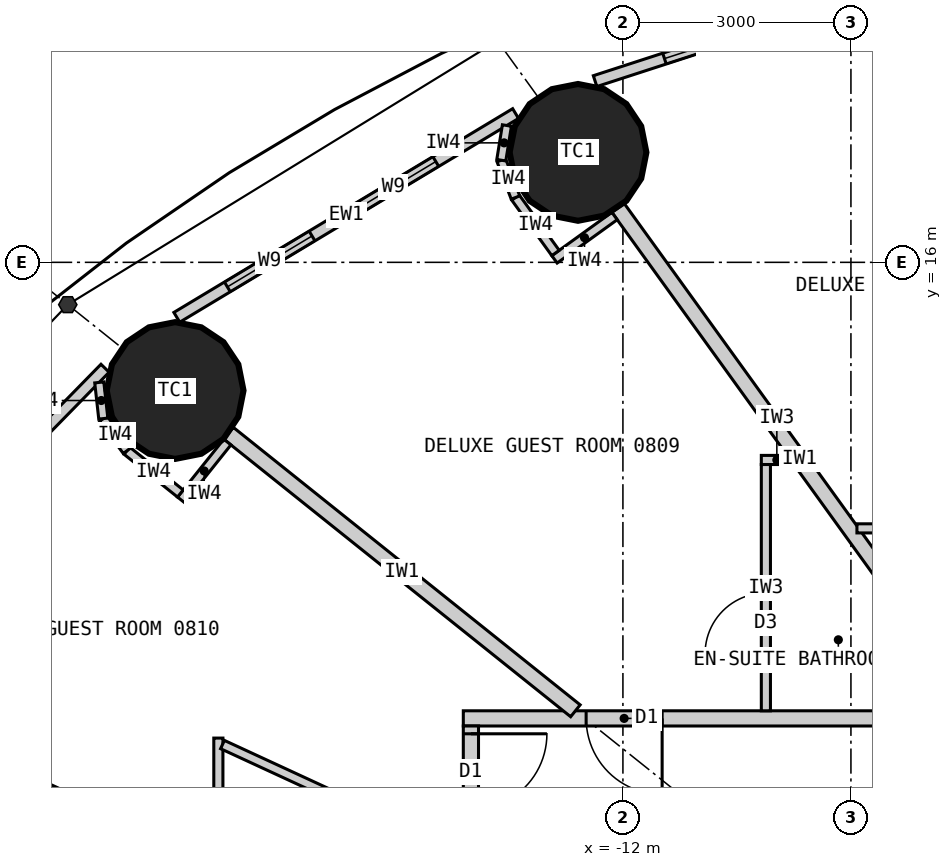
"""IFC4 building model, lengths in metres.
Left out: names, types, materials, properties, quantities, classifications, styles, units other than length and angle.
Written with IfcOpenShell. Run it as: python <this file> out.ifc"""

import sys

from ifc_helpers import new_model, si_unit, direction, frame, frame_2d, origin, origin_2d, place, context, subcontext, project, spatial, rectangle, circle, extrude, element, fill, save


model = new_model("IFC4")
c1 = context("Model", 3, precision=1e-05, world=origin(), true_north=direction((0.0, 1.0)))
c2 = subcontext(c1, "Body", "Model", "MODEL_VIEW")
j1 = project(units=[si_unit("LENGTHUNIT", "METRE"), si_unit("PLANEANGLEUNIT", "RADIAN")], contexts=[c1])
p1 = place(None, origin())
s1 = spatial("IfcSite", under=j1, at=p1, CompositionType="ELEMENT")
p2 = place(p1, origin())
s2 = spatial("IfcBuilding", under=s1, at=p2, CompositionType="ELEMENT")
p3 = place(p2, frame((0.0, 0.0, 39.3)))
s3 = spatial("IfcBuildingStorey", under=s2, at=p3, CompositionType="ELEMENT", Elevation=39.3)
for number, where, z_axis, x_axis in (
    (1, (-12.591, 17.447, 0.0), (0.0, 0.0, 1.0), (1.0, 0.0, 0.0)),
    (2, (-17.892, 14.313, 0.0), (0.0, 0.0, 1.0), (1.0, 0.0, 0.0)),
):
    element("IfcColumn", number, at=place(p3, frame(where, z_axis=z_axis, x_axis=x_axis)), inside=s3, PredefinedType="COLUMN", context=c2, shape_type="SweptSolid", body=[
        extrude(circle(Radius=0.9, at=origin_2d()), origin(), (0.0, 0.0, 1.0), 3.3),
    ])
p4 = place(p3, frame((-7.188, 20.065, 0.0), z_axis=(0.0, 0.0, 1.0), x_axis=(-0.951138486029, -0.308764603532, 0.0)))
e3 = element("IfcWall", 3, at=p4, inside=s3, PredefinedType="ELEMENTEDWALL", context=c2, shape_type="SweptSolid", body=[
    extrude(rectangle(XDim=5.444, YDim=0.15, at=frame_2d((2.722, 0.0))), origin(), (0.0, 0.0, 1.0), 3.12),
])
p5 = place(p4, frame((1.284, 0.0, 0.9)))
e4 = element("IfcOpeningElement", 4, at=p5, cuts=e3, PredefinedType="OPENING", context=c2, shape_type="SweptSolid", body=[
    extrude(rectangle(XDim=1.3, YDim=1.9, at=frame_2d((0.65, 0.95))), frame((0.0, 0.085, 0.0), z_axis=(0.0, -1.0, 0.0), x_axis=(1.0, 0.0, 0.0)), (0.0, 0.0, 1.0), 0.17),
])
p6 = place(p4, frame((3.184, 0.0, 0.9)))
e5 = element("IfcOpeningElement", 5, at=p6, cuts=e3, PredefinedType="OPENING", context=c2, shape_type="SweptSolid", body=[
    extrude(rectangle(XDim=1.3, YDim=1.9, at=frame_2d((0.65, 0.95))), frame((0.0, 0.085, 0.0), z_axis=(0.0, -1.0, 0.0), x_axis=(1.0, 0.0, 0.0)), (0.0, 0.0, 1.0), 0.17),
])
p7 = place(p3, frame((-13.412, 17.957, 0.0), z_axis=(0.0, 0.0, 1.0), x_axis=(-0.856958191554, -0.515385931054, 0.0)))
e6 = element("IfcWall", 6, at=p7, inside=s3, PredefinedType="ELEMENTEDWALL", context=c2, shape_type="SweptSolid", body=[
    extrude(rectangle(XDim=5.201, YDim=0.15, at=frame_2d((2.601, 0.0))), origin(), (0.0, 0.0, 1.0), 3.12),
])
p8 = place(p7, frame((1.225, 0.0, 0.9)))
e7 = element("IfcOpeningElement", 7, at=p8, cuts=e6, PredefinedType="OPENING", context=c2, shape_type="SweptSolid", body=[
    extrude(rectangle(XDim=1.3, YDim=1.9, at=frame_2d((0.65, 0.95))), frame((0.0, 0.085, 0.0), z_axis=(0.0, -1.0, 0.0), x_axis=(1.0, 0.0, 0.0)), (0.0, 0.0, 1.0), 0.17),
])
p9 = place(p7, frame((3.125, 0.0, 0.9)))
e8 = element("IfcOpeningElement", 8, at=p9, cuts=e6, PredefinedType="OPENING", context=c2, shape_type="SweptSolid", body=[
    extrude(rectangle(XDim=1.3, YDim=1.9, at=frame_2d((0.65, 0.95))), frame((0.0, 0.085, 0.0), z_axis=(0.0, -1.0, 0.0), x_axis=(1.0, 0.0, 0.0)), (0.0, 0.0, 1.0), 0.17),
])
p10 = place(p3, frame((-18.813, 14.607, 0.0), z_axis=(0.0, 0.0, 1.0), x_axis=(-0.699612594083, -0.714522370679, 0.0)))
e9 = element("IfcWall", 9, at=p10, inside=s3, PredefinedType="ELEMENTEDWALL", context=c2, shape_type="SweptSolid", body=[
    extrude(rectangle(XDim=4.896, YDim=0.15, at=frame_2d((2.448, 0.0))), origin(), (0.0, 0.0, 1.0), 3.12),
])
p11 = place(p10, frame((1.077, 0.0, 0.9)))
e10 = element("IfcOpeningElement", 10, at=p11, cuts=e9, PredefinedType="OPENING", context=c2, shape_type="SweptSolid", body=[
    extrude(rectangle(XDim=1.3, YDim=1.9, at=frame_2d((0.65, 0.95))), frame((0.0, 0.085, 0.0), z_axis=(0.0, -1.0, 0.0), x_axis=(1.0, 0.0, 0.0)), (0.0, 0.0, 1.0), 0.17),
])
p12 = place(p10, frame((2.977, 0.0, 0.9)))
e11 = element("IfcOpeningElement", 11, at=p12, cuts=e9, PredefinedType="OPENING", context=c2, shape_type="SweptSolid", body=[
    extrude(rectangle(XDim=1.3, YDim=1.9, at=frame_2d((0.65, 0.95))), frame((0.0, 0.085, 0.0), z_axis=(0.0, -1.0, 0.0), x_axis=(1.0, 0.0, 0.0)), (0.0, 0.0, 1.0), 0.17),
])
p13 = place(p3, frame((-14.1, 10.0, 0.0), z_axis=(0.0, 0.0, 1.0), x_axis=(1.0, 0.0, 0.0)))
e12 = element("IfcWall", 12, at=p13, inside=s3, PredefinedType="PARTITIONING", context=c2, shape_type="SweptSolid", body=[
    extrude(rectangle(XDim=28.2, YDim=0.2, at=frame_2d((14.1, 0.0))), origin(), (0.0, 0.0, 1.0), 3.12),
])
p14 = place(p13, frame((23.477, 0.0, 0.0)))
e13 = element("IfcOpeningElement", 13, at=p14, cuts=e12, PredefinedType="OPENING", context=c2, shape_type="SweptSolid", body=[
    extrude(rectangle(XDim=1.0, YDim=2.2, at=frame_2d((0.5, 1.1))), frame((0.0, 0.11, 0.0), z_axis=(0.0, -1.0, 0.0), x_axis=(1.0, 0.0, 0.0)), (0.0, 0.0, 1.0), 0.22),
])
p15 = place(p13, frame((18.529, 0.0, 0.0)))
e14 = element("IfcOpeningElement", 14, at=p15, cuts=e12, PredefinedType="OPENING", context=c2, shape_type="SweptSolid", body=[
    extrude(rectangle(XDim=1.0, YDim=2.2, at=frame_2d((0.5, 1.1))), frame((0.0, 0.11, 0.0), z_axis=(0.0, -1.0, 0.0), x_axis=(1.0, 0.0, 0.0)), (0.0, 0.0, 1.0), 0.22),
])
p16 = place(p13, frame((14.623, 0.0, 0.0)))
e15 = element("IfcOpeningElement", 15, at=p16, cuts=e12, PredefinedType="OPENING", context=c2, shape_type="SweptSolid", body=[
    extrude(rectangle(XDim=1.0, YDim=2.2, at=frame_2d((0.5, 1.1))), frame((0.0, 0.11, 0.0), z_axis=(0.0, -1.0, 0.0), x_axis=(1.0, 0.0, 0.0)), (0.0, 0.0, 1.0), 0.22),
])
p17 = place(p13, frame((11.252, 0.0, 0.0)))
e16 = element("IfcOpeningElement", 16, at=p17, cuts=e12, PredefinedType="OPENING", context=c2, shape_type="SweptSolid", body=[
    extrude(rectangle(XDim=1.0, YDim=2.1, at=frame_2d((0.5, 1.05))), frame((0.0, 0.11, 0.0), z_axis=(0.0, -1.0, 0.0), x_axis=(1.0, 0.0, 0.0)), (0.0, 0.0, 1.0), 0.22),
])
p18 = place(p13, frame((8.671, 0.0, 0.0)))
e17 = element("IfcOpeningElement", 17, at=p18, cuts=e12, PredefinedType="OPENING", context=c2, shape_type="SweptSolid", body=[
    extrude(rectangle(XDim=1.0, YDim=2.2, at=frame_2d((0.5, 1.1))), frame((0.0, 0.11, 0.0), z_axis=(0.0, -1.0, 0.0), x_axis=(1.0, 0.0, 0.0)), (0.0, 0.0, 1.0), 0.22),
])
p19 = place(p13, frame((1.616, 0.0, 0.0)))
e18 = element("IfcOpeningElement", 18, at=p19, cuts=e12, PredefinedType="OPENING", context=c2, shape_type="SweptSolid", body=[
    extrude(rectangle(XDim=1.0, YDim=2.2, at=frame_2d((0.5, 1.1))), frame((0.0, 0.11, 0.0), z_axis=(0.0, -1.0, 0.0), x_axis=(1.0, 0.0, 0.0)), (0.0, 0.0, 1.0), 0.22),
])
p20 = place(p3, frame((-14.0, 9.9, 0.0), z_axis=(0.0, 0.0, 1.0), x_axis=(0.0, -1.0, 0.0)))
e19 = element("IfcWall", 19, at=p20, inside=s3, PredefinedType="PARTITIONING", context=c2, shape_type="SweptSolid", body=[
    extrude(rectangle(XDim=19.8, YDim=0.2, at=frame_2d((9.9, 0.0))), origin(), (0.0, 0.0, 1.0), 3.12),
])
p21 = place(p20, frame((0.103, 0.0, 0.0)))
e20 = element("IfcOpeningElement", 20, at=p21, cuts=e19, PredefinedType="OPENING", context=c2, shape_type="SweptSolid", body=[
    extrude(rectangle(XDim=1.0, YDim=2.2, at=frame_2d((0.5, 1.1))), frame((0.0, 0.11, 0.0), z_axis=(0.0, -1.0, 0.0), x_axis=(1.0, 0.0, 0.0)), (0.0, 0.0, 1.0), 0.22),
])
p22 = place(p20, frame((5.252, 0.0, 0.0)))
e21 = element("IfcOpeningElement", 21, at=p22, cuts=e19, PredefinedType="OPENING", context=c2, shape_type="SweptSolid", body=[
    extrude(rectangle(XDim=1.0, YDim=2.0, at=frame_2d((0.5, 1.0))), frame((0.0, 0.11, 0.0), z_axis=(0.0, -1.0, 0.0), x_axis=(1.0, 0.0, 0.0)), (0.0, 0.0, 1.0), 0.22),
])
p23 = place(p20, frame((10.117, 0.0, 0.0)))
e22 = element("IfcOpeningElement", 22, at=p23, cuts=e19, PredefinedType="OPENING", context=c2, shape_type="SweptSolid", body=[
    extrude(rectangle(XDim=1.0, YDim=2.2, at=frame_2d((0.5, 1.1))), frame((0.0, 0.11, 0.0), z_axis=(0.0, -1.0, 0.0), x_axis=(1.0, 0.0, 0.0)), (0.0, 0.0, 1.0), 0.22),
])
p24 = place(p20, frame((13.247, 0.0, 0.0)))
e23 = element("IfcOpeningElement", 23, at=p24, cuts=e19, PredefinedType="OPENING", context=c2, shape_type="SweptSolid", body=[
    extrude(rectangle(XDim=1.0, YDim=2.0, at=frame_2d((0.5, 1.0))), frame((0.0, 0.11, 0.0), z_axis=(0.0, -1.0, 0.0), x_axis=(1.0, 0.0, 0.0)), (0.0, 0.0, 1.0), 0.22),
])
p25 = place(p20, frame((15.679, 0.0, 0.0)))
e24 = element("IfcOpeningElement", 24, at=p25, cuts=e19, PredefinedType="OPENING", context=c2, shape_type="SweptSolid", body=[
    extrude(rectangle(XDim=1.0, YDim=2.2, at=frame_2d((0.5, 1.1))), frame((0.0, 0.11, 0.0), z_axis=(0.0, -1.0, 0.0), x_axis=(1.0, 0.0, 0.0)), (0.0, 0.0, 1.0), 0.22),
])
p26 = place(p3, frame((-7.289, 10.1, 0.0), z_axis=(0.0, 0.0, 1.0), x_axis=(-0.585216319319, 0.810877216108, 0.0)))
e25 = element("IfcWall", 25, at=p26, inside=s3, PredefinedType="PARTITIONING", context=c2, shape_type="SweptSolid", body=[
    extrude(rectangle(XDim=8.16, YDim=0.2, at=frame_2d((4.08, 0.0))), origin(), (0.0, 0.0, 1.0), 2.32),
])
p27 = place(p3, frame((-12.625, 10.1, 0.0), z_axis=(0.0, 0.0, 1.0), x_axis=(-0.780872884676, 0.624689953479, 0.0)))
e26 = element("IfcWall", 26, at=p27, inside=s3, PredefinedType="PARTITIONING", context=c2, shape_type="SweptSolid", body=[
    extrude(rectangle(XDim=5.845, YDim=0.2, at=frame_2d((2.922, 0.0))), origin(), (0.0, 0.0, 1.0), 2.32),
])
p28 = place(p3, frame((-14.1, 6.512, 0.0), z_axis=(0.0, 0.0, 1.0), x_axis=(-0.907842433118, 0.41931147925, 0.0)))
e27 = element("IfcWall", 27, at=p28, inside=s3, PredefinedType="PARTITIONING", context=c2, shape_type="SweptSolid", body=[
    extrude(rectangle(XDim=7.823, YDim=0.2, at=frame_2d((3.912, 0.0))), origin(), (0.0, 0.0, 1.0), 2.32),
])
p29 = place(p3, frame((-8.921, 12.5, 0.0), z_axis=(0.0, 0.0, 1.0), x_axis=(1.0, 0.0, 0.0)))
e28 = element("IfcWall", 28, at=p29, inside=s3, PredefinedType="PARTITIONING", context=c2, shape_type="SweptSolid", body=[
    extrude(rectangle(XDim=3.372, YDim=0.12, at=frame_2d((1.686, 0.0))), origin(), (0.0, 0.0, 1.0), 3.12),
])
p30 = place(p3, frame((-9.771, 13.4, 0.0), z_axis=(0.0, 0.0, 1.0), x_axis=(-1.0, 0.0, 0.0)))
e29 = element("IfcWall", 29, at=p30, inside=s3, PredefinedType="PARTITIONING", context=c2, shape_type="SweptSolid", body=[
    extrude(rectangle(XDim=0.408, YDim=0.12, at=frame_2d((0.204, 0.0))), origin(), (0.0, 0.0, 1.0), 3.12),
])
p31 = place(p3, frame((-10.119, 10.1, 0.0), z_axis=(0.0, 0.0, 1.0), x_axis=(0.0, 1.0, 0.0)))
e30 = element("IfcWall", 30, at=p31, inside=s3, PredefinedType="PARTITIONING", context=c2, shape_type="SweptSolid", body=[
    extrude(rectangle(XDim=3.24, YDim=0.12, at=frame_2d((1.62, 0.0))), origin(), (0.0, 0.0, 1.0), 3.12),
])
p32 = place(p31, frame((0.75, 0.0, 0.0)))
e31 = element("IfcOpeningElement", 31, at=p32, cuts=e30, PredefinedType="OPENING", context=c2, shape_type="SweptSolid", body=[
    extrude(rectangle(XDim=0.8, YDim=2.1, at=frame_2d((0.4, 1.05))), frame((0.0, 0.07, 0.0), z_axis=(0.0, -1.0, 0.0), x_axis=(1.0, 0.0, 0.0)), (0.0, 0.0, 1.0), 0.14),
])
p33 = place(p3, frame((-17.323, 8.101, 0.0), z_axis=(0.0, 0.0, 1.0), x_axis=(0.0, 1.0, 0.0)))
e32 = element("IfcWall", 32, at=p33, inside=s3, PredefinedType="PARTITIONING", context=c2, shape_type="SweptSolid", body=[
    extrude(rectangle(XDim=1.64, YDim=0.12, at=frame_2d((0.82, 0.0))), origin(), (0.0, 0.0, 1.0), 3.12),
])
p34 = place(p3, frame((-14.1, 8.193, 0.0), z_axis=(0.0, 0.0, 1.0), x_axis=(-0.907836493557, 0.419324338628, 0.0)))
e33 = element("IfcWall", 33, at=p34, inside=s3, PredefinedType="PARTITIONING", context=c2, shape_type="SweptSolid", body=[
    extrude(rectangle(XDim=3.49, YDim=0.12, at=frame_2d((1.745, 0.0))), origin(), (0.0, 0.0, 1.0), 3.12),
])
p35 = place(p34, frame((0.75, 0.0, 0.0)))
e34 = element("IfcOpeningElement", 34, at=p35, cuts=e33, PredefinedType="OPENING", context=c2, shape_type="SweptSolid", body=[
    extrude(rectangle(XDim=0.8, YDim=2.1, at=frame_2d((0.4, 1.05))), frame((0.0, 0.07, 0.0), z_axis=(0.0, -1.0, 0.0), x_axis=(1.0, 0.0, 0.0)), (0.0, 0.0, 1.0), 0.14),
])
p36 = place(p3, frame((-12.11, 16.609, 0.0), z_axis=(0.0, 0.0, 1.0), x_axis=(-0.810897160646, -0.585188683123, 0.0)))
e35 = element("IfcWall", 35, at=p36, inside=s3, PredefinedType="PARTITIONING", context=c2, shape_type="SweptSolid", body=[
    extrude(rectangle(XDim=0.975, YDim=0.12, at=frame_2d((0.487, 0.0))), origin(), (0.0, 0.0, 1.0), 3.12),
])
p37 = place(p3, frame((-12.887, 16.123, 0.0), z_axis=(0.0, 0.0, 1.0), x_axis=(-0.585054732094, 0.810993810367, 0.0)))
e36 = element("IfcWall", 36, at=p37, inside=s3, PredefinedType="PARTITIONING", context=c2, shape_type="SweptSolid", body=[
    extrude(rectangle(XDim=0.9, YDim=0.12, at=frame_2d((0.45, 0.0))), origin(), (0.0, 0.0, 1.0), 3.12),
])
p38 = place(p3, frame((-13.414, 16.853, 0.0), z_axis=(0.0, 0.0, 1.0), x_axis=(-0.355705277023, 0.934598178844, 0.0)))
e37 = element("IfcWall", 37, at=p38, inside=s3, PredefinedType="PARTITIONING", context=c2, shape_type="SweptSolid", body=[
    extrude(rectangle(XDim=0.525, YDim=0.12, at=frame_2d((0.263, 0.0))), origin(), (0.0, 0.0, 1.0), 3.12),
])
p39 = place(p3, frame((-13.6, 17.344, 0.0), z_axis=(0.0, 0.0, 1.0), x_axis=(0.15994604532, 0.987125758243, 0.0)))
e38 = element("IfcWall", 38, at=p39, inside=s3, PredefinedType="PARTITIONING", context=c2, shape_type="SweptSolid", body=[
    extrude(rectangle(XDim=0.462, YDim=0.12, at=frame_2d((0.231, 0.0))), origin(), (0.0, 0.0, 1.0), 3.12),
])
p40 = place(p3, frame((-17.205, 13.635, 0.0), z_axis=(0.0, 0.0, 1.0), x_axis=(-0.624756144097, -0.780819928289, 0.0)))
e39 = element("IfcWall", 39, at=p40, inside=s3, PredefinedType="PARTITIONING", context=c2, shape_type="SweptSolid", body=[
    extrude(rectangle(XDim=0.975, YDim=0.12, at=frame_2d((0.487, 0.0))), origin(), (0.0, 0.0, 1.0), 3.12),
])
p41 = place(p3, frame((-17.823, 12.959, 0.0), z_axis=(0.0, 0.0, 1.0), x_axis=(-0.780895271023, 0.624661969144, 0.0)))
e40 = element("IfcWall", 40, at=p41, inside=s3, PredefinedType="PARTITIONING", context=c2, shape_type="SweptSolid", body=[
    extrude(rectangle(XDim=0.9, YDim=0.12, at=frame_2d((0.45, 0.0))), origin(), (0.0, 0.0, 1.0), 3.12),
])
p42 = place(p3, frame((-18.526, 13.521, 0.0), z_axis=(0.0, 0.0, 1.0), x_axis=(-0.592532503205, 0.805546542818, 0.0)))
e41 = element("IfcWall", 41, at=p42, inside=s3, PredefinedType="PARTITIONING", context=c2, shape_type="SweptSolid", body=[
    extrude(rectangle(XDim=0.525, YDim=0.12, at=frame_2d((0.262, 0.0))), origin(), (0.0, 0.0, 1.0), 3.12),
])
p43 = place(p3, frame((-18.837, 13.944, 0.0), z_axis=(0.0, 0.0, 1.0), x_axis=(-0.110543348478, 0.993871303594, 0.0)))
e42 = element("IfcWall", 42, at=p43, inside=s3, PredefinedType="PARTITIONING", context=c2, shape_type="SweptSolid", body=[
    extrude(rectangle(XDim=0.479, YDim=0.12, at=frame_2d((0.24, 0.0))), origin(), (0.0, 0.0, 1.0), 3.12),
])
p44 = place(p6, origin())
e43 = element("IfcWindow", 43, at=p44, inside=s3, PartitioningType="SINGLE_PANEL", PredefinedType="WINDOW", context=c2, shape_type="SweptSolid", body=[
    extrude(rectangle(XDim=1.3, YDim=1.9, at=frame_2d((0.65, 0.95))), frame((0.0, 0.03, 0.0), z_axis=(0.0, -1.0, 0.0), x_axis=(1.0, 0.0, 0.0)), (0.0, 0.0, 1.0), 0.06),
])
fill(e5, e43)
p45 = place(p8, origin())
e44 = element("IfcWindow", 44, at=p45, inside=s3, PartitioningType="SINGLE_PANEL", PredefinedType="WINDOW", context=c2, shape_type="SweptSolid", body=[
    extrude(rectangle(XDim=1.3, YDim=1.9, at=frame_2d((0.65, 0.95))), frame((0.0, 0.03, 0.0), z_axis=(0.0, -1.0, 0.0), x_axis=(1.0, 0.0, 0.0)), (0.0, 0.0, 1.0), 0.06),
])
fill(e7, e44)
p46 = place(p9, origin())
e45 = element("IfcWindow", 45, at=p46, inside=s3, PartitioningType="SINGLE_PANEL", PredefinedType="WINDOW", context=c2, shape_type="SweptSolid", body=[
    extrude(rectangle(XDim=1.3, YDim=1.9, at=frame_2d((0.65, 0.95))), frame((0.0, 0.03, 0.0), z_axis=(0.0, -1.0, 0.0), x_axis=(1.0, 0.0, 0.0)), (0.0, 0.0, 1.0), 0.06),
])
fill(e8, e45)
p47 = place(p32, origin())
e46 = element("IfcDoor", 46, at=p47, inside=s3, OperationType="SINGLE_SWING_LEFT", PredefinedType="DOOR", context=c2, shape_type="SweptSolid", body=[
    extrude(rectangle(XDim=0.8, YDim=2.1, at=frame_2d((0.4, 1.05))), frame((0.0, 0.025, 0.0), z_axis=(0.0, -1.0, 0.0), x_axis=(1.0, 0.0, 0.0)), (0.0, 0.0, 1.0), 0.05),
])
fill(e31, e46)
p48 = place(p19, origin())
e47 = element("IfcDoor", 47, at=p48, inside=s3, OperationType="SINGLE_SWING_RIGHT", PredefinedType="DOOR", context=c2, shape_type="SweptSolid", body=[
    extrude(rectangle(XDim=1.0, YDim=2.2, at=frame_2d((0.5, 1.1))), frame((0.0, 0.025, 0.0), z_axis=(0.0, -1.0, 0.0), x_axis=(1.0, 0.0, 0.0)), (0.0, 0.0, 1.0), 0.05),
])
fill(e18, e47)
p49 = place(p21, origin())
e48 = element("IfcDoor", 48, at=p49, inside=s3, OperationType="SINGLE_SWING_LEFT", PredefinedType="DOOR", context=c2, shape_type="SweptSolid", body=[
    extrude(rectangle(XDim=1.0, YDim=2.2, at=frame_2d((0.5, 1.1))), frame((0.0, 0.025, 0.0), z_axis=(0.0, -1.0, 0.0), x_axis=(1.0, 0.0, 0.0)), (0.0, 0.0, 1.0), 0.05),
])
fill(e20, e48)
save(model, sys.argv[1])
